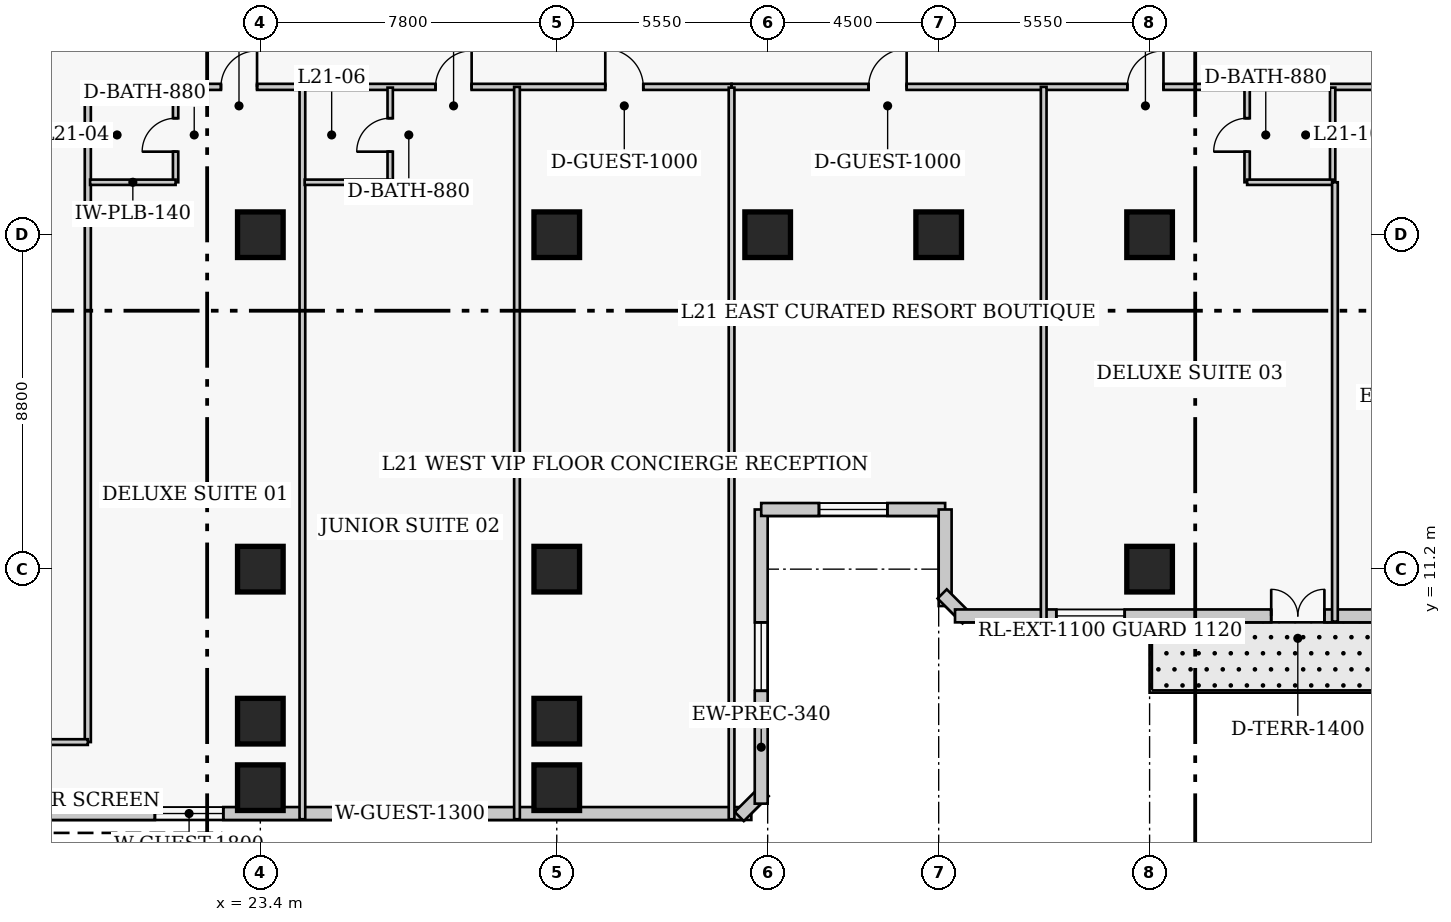
"""IFC4 building model, lengths in metres.
Left out: names, types, materials, properties, quantities, classifications, styles, units other than length and angle.
Written with IfcOpenShell. Run it as: python <this file> out.ifc"""

import sys

from ifc_helpers import new_model, si_unit, direction, frame, frame_2d, origin, origin_2d, place, context, subcontext, project, spatial, rectangle, extrude, element, fill, save


model = new_model("IFC4")
c1 = context("Model", 3, precision=1e-05, world=origin(), true_north=direction((0.0, 1.0)))
c2 = subcontext(c1, "Body", "Model", "MODEL_VIEW")
j1 = project(units=[si_unit("LENGTHUNIT", "METRE"), si_unit("PLANEANGLEUNIT", "RADIAN")], contexts=[c1])
p1 = place(None, origin())
s1 = spatial("IfcSite", under=j1, at=p1, CompositionType="ELEMENT")
p2 = place(p1, origin())
s2 = spatial("IfcBuilding", under=s1, at=p2, CompositionType="ELEMENT")
p3 = place(p2, frame((0.0, 0.0, 88.0)))
s3 = spatial("IfcBuildingStorey", under=s2, at=p3, CompositionType="ELEMENT", Elevation=88.0)
for number, where, z_axis, x_axis in (
    (1, (23.4, 11.2, 0.0), (0.0, 0.0, 1.0), (1.0, 0.0, 0.0)),
    (2, (23.4, 20.0, 0.0), (0.0, 0.0, 1.0), (1.0, 0.0, 0.0)),
    (3, (31.2, 11.2, 0.0), (0.0, 0.0, 1.0), (1.0, 0.0, 0.0)),
    (4, (31.2, 20.0, 0.0), (0.0, 0.0, 1.0), (1.0, 0.0, 0.0)),
    (5, (36.75, 20.0, 0.0), (0.0, 0.0, 1.0), (1.0, 0.0, 0.0)),
    (6, (41.25, 20.0, 0.0), (0.0, 0.0, 1.0), (1.0, 0.0, 0.0)),
    (7, (46.8, 11.2, 0.0), (0.0, 0.0, 1.0), (1.0, 0.0, 0.0)),
    (8, (46.8, 20.0, 0.0), (0.0, 0.0, 1.0), (1.0, 0.0, 0.0)),
    (9, (23.4, 7.2, 0.0), (0.0, 0.0, 1.0), (1.0, 0.0, 0.0)),
    (10, (31.2, 7.2, 0.0), (0.0, 0.0, 1.0), (1.0, 0.0, 0.0)),
    (11, (23.4, 5.45, 0.0), (0.0, 0.0, 1.0), (1.0, 0.0, 0.0)),
    (12, (31.2, 5.45, 0.0), (0.0, 0.0, 1.0), (1.0, 0.0, 0.0)),
):
    element("IfcColumn", number, at=place(p3, frame(where, z_axis=z_axis, x_axis=x_axis)), inside=s3, PredefinedType="COLUMN", context=c2, shape_type="SweptSolid", body=[
        extrude(rectangle(XDim=1.2, YDim=1.2, at=origin_2d()), origin(), (0.0, 0.0, 1.0), 3.8),
    ])
p4 = place(p3, frame((8.03, 4.77, 0.0), z_axis=(0.0, 0.0, 1.0), x_axis=(1.0, 0.0, 0.0)))
e13 = element("IfcWall", 13, at=p4, inside=s3, PredefinedType="SOLIDWALL", context=c2, shape_type="SweptSolid", body=[
    extrude(rectangle(XDim=28.29, YDim=0.34, at=frame_2d((14.145, 0.0))), origin(), (0.0, 0.0, 1.0), 3.54),
])
p5 = place(p4, frame((12.595, 0.0, 0.85)))
e14 = element("IfcOpeningElement", 14, at=p5, cuts=e13, PredefinedType="OPENING", context=c2, shape_type="SweptSolid", body=[
    extrude(rectangle(XDim=1.8, YDim=1.8, at=frame_2d((0.9, 0.9))), frame((0.0, 0.18, 0.0), z_axis=(0.0, -1.0, 0.0), x_axis=(1.0, 0.0, 0.0)), (0.0, 0.0, 1.0), 0.36),
])
p6 = place(p4, frame((18.66, 0.0, 0.85)))
e15 = element("IfcOpeningElement", 15, at=p6, cuts=e13, PredefinedType="OPENING", context=c2, shape_type="SweptSolid", body=[
    extrude(rectangle(XDim=1.3, YDim=1.7, at=frame_2d((0.65, 0.85))), frame((0.0, 0.18, 0.0), z_axis=(0.0, -1.0, 0.0), x_axis=(1.0, 0.0, 0.0)), (0.0, 0.0, 1.0), 0.36),
])
p7 = place(p3, frame((36.001, 4.692, 0.0), z_axis=(0.0, 0.0, 1.0), x_axis=(0.707238225886, 0.706975312048, 0.0)))
e16 = element("IfcWall", 16, at=p7, inside=s3, PredefinedType="SOLIDWALL", context=c2, shape_type="SweptSolid", body=[
    extrude(rectangle(XDim=0.929, YDim=0.34, at=frame_2d((0.464, 0.0))), origin(), (0.0, 0.0, 1.0), 3.54),
])
p8 = place(p3, frame((36.58, 5.03, 0.0), z_axis=(0.0, 0.0, 1.0), x_axis=(0.0, 1.0, 0.0)))
e17 = element("IfcWall", 17, at=p8, inside=s3, PredefinedType="SOLIDWALL", context=c2, shape_type="SweptSolid", body=[
    extrude(rectangle(XDim=7.74, YDim=0.34, at=frame_2d((3.87, 0.0))), origin(), (0.0, 0.0, 1.0), 3.54),
])
p9 = place(p8, frame((2.97, 0.0, 0.85)))
e18 = element("IfcOpeningElement", 18, at=p9, cuts=e17, PredefinedType="OPENING", context=c2, shape_type="SweptSolid", body=[
    extrude(rectangle(XDim=1.8, YDim=1.8, at=frame_2d((0.9, 0.9))), frame((0.0, 0.18, 0.0), z_axis=(0.0, -1.0, 0.0), x_axis=(1.0, 0.0, 0.0)), (0.0, 0.0, 1.0), 0.36),
])
p10 = place(p3, frame((36.58, 12.77, 0.0), z_axis=(0.0, 0.0, 1.0), x_axis=(1.0, 0.0, 0.0)))
e19 = element("IfcWall", 19, at=p10, inside=s3, PredefinedType="SOLIDWALL", context=c2, shape_type="SweptSolid", body=[
    extrude(rectangle(XDim=4.84, YDim=0.34, at=frame_2d((2.42, 0.0))), origin(), (0.0, 0.0, 1.0), 3.54),
])
p11 = place(p10, frame((1.52, 0.0, 0.85)))
e20 = element("IfcOpeningElement", 20, at=p11, cuts=e19, PredefinedType="OPENING", context=c2, shape_type="SweptSolid", body=[
    extrude(rectangle(XDim=1.8, YDim=1.8, at=frame_2d((0.9, 0.9))), frame((0.0, 0.18, 0.0), z_axis=(0.0, -1.0, 0.0), x_axis=(1.0, 0.0, 0.0)), (0.0, 0.0, 1.0), 0.36),
])
p12 = place(p3, frame((41.42, 12.77, 0.0), z_axis=(0.0, 0.0, 1.0), x_axis=(0.0, -1.0, 0.0)))
e21 = element("IfcWall", 21, at=p12, inside=s3, PredefinedType="SOLIDWALL", context=c2, shape_type="SweptSolid", body=[
    extrude(rectangle(XDim=2.54, YDim=0.34, at=frame_2d((1.27, 0.0))), origin(), (0.0, 0.0, 1.0), 3.54),
])
p13 = place(p3, frame((41.342, 10.549, 0.0), z_axis=(0.0, 0.0, 1.0), x_axis=(0.707106781187, -0.707106781187, 0.0)))
e22 = element("IfcWall", 22, at=p13, inside=s3, PredefinedType="SOLIDWALL", context=c2, shape_type="SweptSolid", body=[
    extrude(rectangle(XDim=0.929, YDim=0.34, at=frame_2d((0.464, 0.0))), origin(), (0.0, 0.0, 1.0), 3.54),
])
p14 = place(p3, frame((41.68, 9.97, 0.0), z_axis=(0.0, 0.0, 1.0), x_axis=(1.0, 0.0, 0.0)))
e23 = element("IfcWall", 23, at=p14, inside=s3, PredefinedType="SOLIDWALL", context=c2, shape_type="SweptSolid", body=[
    extrude(rectangle(XDim=28.29, YDim=0.34, at=frame_2d((14.145, 0.0))), origin(), (0.0, 0.0, 1.0), 3.54),
])
p15 = place(p14, frame((8.32, 0.0, 0.0)))
e24 = element("IfcOpeningElement", 24, at=p15, cuts=e23, PredefinedType="OPENING", context=c2, shape_type="SweptSolid", body=[
    extrude(rectangle(XDim=1.4, YDim=2.15, at=frame_2d((0.7, 1.075))), frame((0.0, 0.18, 0.0), z_axis=(0.0, -1.0, 0.0), x_axis=(1.0, 0.0, 0.0)), (0.0, 0.0, 1.0), 0.36),
])
p16 = place(p14, frame((2.665, 0.0, 0.85)))
e25 = element("IfcOpeningElement", 25, at=p16, cuts=e23, PredefinedType="OPENING", context=c2, shape_type="SweptSolid", body=[
    extrude(rectangle(XDim=1.8, YDim=1.8, at=frame_2d((0.9, 0.9))), frame((0.0, 0.18, 0.0), z_axis=(0.0, -1.0, 0.0), x_axis=(1.0, 0.0, 0.0)), (0.0, 0.0, 1.0), 0.36),
])
p17 = place(p14, frame((13.895, 0.0, 0.85)))
e26 = element("IfcOpeningElement", 26, at=p17, cuts=e23, PredefinedType="OPENING", context=c2, shape_type="SweptSolid", body=[
    extrude(rectangle(XDim=1.8, YDim=1.8, at=frame_2d((0.9, 0.9))), frame((0.0, 0.18, 0.0), z_axis=(0.0, -1.0, 0.0), x_axis=(1.0, 0.0, 0.0)), (0.0, 0.0, 1.0), 0.36),
])
p18 = place(p3, frame((18.8, 23.89, 0.0), z_axis=(0.0, 0.0, 1.0), x_axis=(1.0, 0.0, 0.0)))
e27 = element("IfcWall", 27, at=p18, inside=s3, PredefinedType="PARTITIONING", context=c2, shape_type="SweptSolid", body=[
    extrude(rectangle(XDim=17.0, YDim=0.16, at=frame_2d((8.5, 0.0))), origin(), (0.0, 0.0, 1.0), 3.54),
])
p19 = place(p18, frame((3.563, 0.0, 0.0)))
e28 = element("IfcOpeningElement", 28, at=p19, cuts=e27, PredefinedType="OPENING", context=c2, shape_type="SweptSolid", body=[
    extrude(rectangle(XDim=0.95, YDim=2.1, at=frame_2d((0.475, 1.05))), frame((0.0, 0.09, 0.0), z_axis=(0.0, -1.0, 0.0), x_axis=(1.0, 0.0, 0.0)), (0.0, 0.0, 1.0), 0.18),
])
p20 = place(p18, frame((9.21, 0.0, 0.0)))
e29 = element("IfcOpeningElement", 29, at=p20, cuts=e27, PredefinedType="OPENING", context=c2, shape_type="SweptSolid", body=[
    extrude(rectangle(XDim=0.95, YDim=2.1, at=frame_2d((0.475, 1.05))), frame((0.0, 0.09, 0.0), z_axis=(0.0, -1.0, 0.0), x_axis=(1.0, 0.0, 0.0)), (0.0, 0.0, 1.0), 0.18),
])
p21 = place(p18, frame((13.677, 0.0, 0.0)))
e30 = element("IfcOpeningElement", 30, at=p21, cuts=e27, PredefinedType="OPENING", context=c2, shape_type="SweptSolid", body=[
    extrude(rectangle(XDim=1.0, YDim=2.15, at=frame_2d((0.5, 1.075))), frame((0.0, 0.09, 0.0), z_axis=(0.0, -1.0, 0.0), x_axis=(1.0, 0.0, 0.0)), (0.0, 0.0, 1.0), 0.18),
])
p22 = place(p3, frame((35.8, 23.89, 0.0), z_axis=(0.0, 0.0, 1.0), x_axis=(1.0, 0.0, 0.0)))
e31 = element("IfcWall", 31, at=p22, inside=s3, PredefinedType="PARTITIONING", context=c2, shape_type="SweptSolid", body=[
    extrude(rectangle(XDim=23.05, YDim=0.16, at=frame_2d((11.525, 0.0))), origin(), (0.0, 0.0, 1.0), 3.54),
])
p23 = place(p22, frame((3.607, 0.0, 0.0)))
e32 = element("IfcOpeningElement", 32, at=p23, cuts=e31, PredefinedType="OPENING", context=c2, shape_type="SweptSolid", body=[
    extrude(rectangle(XDim=1.0, YDim=2.15, at=frame_2d((0.5, 1.075))), frame((0.0, 0.09, 0.0), z_axis=(0.0, -1.0, 0.0), x_axis=(1.0, 0.0, 0.0)), (0.0, 0.0, 1.0), 0.18),
])
p24 = place(p22, frame((10.415, 0.0, 0.0)))
e33 = element("IfcOpeningElement", 33, at=p24, cuts=e31, PredefinedType="OPENING", context=c2, shape_type="SweptSolid", body=[
    extrude(rectangle(XDim=0.95, YDim=2.1, at=frame_2d((0.475, 1.05))), frame((0.0, 0.09, 0.0), z_axis=(0.0, -1.0, 0.0), x_axis=(1.0, 0.0, 0.0)), (0.0, 0.0, 1.0), 0.18),
])
p25 = place(p22, frame((17.803, 0.0, 0.0)))
e34 = element("IfcOpeningElement", 34, at=p25, cuts=e31, PredefinedType="OPENING", context=c2, shape_type="SweptSolid", body=[
    extrude(rectangle(XDim=0.95, YDim=2.1, at=frame_2d((0.475, 1.05))), frame((0.0, 0.09, 0.0), z_axis=(0.0, -1.0, 0.0), x_axis=(1.0, 0.0, 0.0)), (0.0, 0.0, 1.0), 0.18),
])
p26 = place(p3, frame((18.86, 6.65, 0.0), z_axis=(0.0, 0.0, 1.0), x_axis=(0.0, 1.0, 0.0)))
e35 = element("IfcWall", 35, at=p26, inside=s3, PredefinedType="PARTITIONING", context=c2, shape_type="SweptSolid", body=[
    extrude(rectangle(XDim=17.24, YDim=0.16, at=frame_2d((8.62, 0.0))), origin(), (0.0, 0.0, 1.0), 3.54),
])
p27 = place(p3, frame((16.64, 6.65, 0.0), z_axis=(0.0, 0.0, 1.0), x_axis=(1.0, 0.0, 0.0)))
e36 = element("IfcWall", 36, at=p27, inside=s3, PredefinedType="PARTITIONING", context=c2, shape_type="SweptSolid", body=[
    extrude(rectangle(XDim=2.22, YDim=0.15, at=frame_2d((1.11, 0.0))), origin(), (0.0, 0.0, 1.0), 3.54),
])
p28 = place(p3, frame((21.17, 21.38, 0.0), z_axis=(0.0, 0.0, 1.0), x_axis=(0.0, 1.0, 0.0)))
e37 = element("IfcWall", 37, at=p28, inside=s3, PredefinedType="PLUMBINGWALL", context=c2, shape_type="SweptSolid", body=[
    extrude(rectangle(XDim=2.49, YDim=0.14, at=frame_2d((1.245, 0.0))), origin(), (0.0, 0.0, 1.0), 3.54),
])
p29 = place(p28, frame((0.805, 0.0, 0.0)))
e38 = element("IfcOpeningElement", 38, at=p29, cuts=e37, PredefinedType="OPENING", context=c2, shape_type="SweptSolid", body=[
    extrude(rectangle(XDim=0.88, YDim=2.05, at=frame_2d((0.44, 1.025))), frame((0.0, 0.08, 0.0), z_axis=(0.0, -1.0, 0.0), x_axis=(1.0, 0.0, 0.0)), (0.0, 0.0, 1.0), 0.16),
])
p30 = place(p3, frame((18.92, 21.38, 0.0), z_axis=(0.0, 0.0, 1.0), x_axis=(1.0, 0.0, 0.0)))
e39 = element("IfcWall", 39, at=p30, inside=s3, PredefinedType="PLUMBINGWALL", context=c2, shape_type="SweptSolid", body=[
    extrude(rectangle(XDim=2.25, YDim=0.14, at=frame_2d((1.125, 0.0))), origin(), (0.0, 0.0, 1.0), 3.54),
])
p31 = place(p3, frame((24.507, 4.62, 0.0), z_axis=(0.0, 0.0, 1.0), x_axis=(0.0, 1.0, 0.0)))
e40 = element("IfcWall", 40, at=p31, inside=s3, PredefinedType="PARTITIONING", context=c2, shape_type="SweptSolid", body=[
    extrude(rectangle(XDim=19.27, YDim=0.15, at=frame_2d((9.635, 0.0))), origin(), (0.0, 0.0, 1.0), 3.54),
])
p32 = place(p3, frame((26.817, 21.38, 0.0), z_axis=(0.0, 0.0, 1.0), x_axis=(0.0, 1.0, 0.0)))
e41 = element("IfcWall", 41, at=p32, inside=s3, PredefinedType="PLUMBINGWALL", context=c2, shape_type="SweptSolid", body=[
    extrude(rectangle(XDim=2.49, YDim=0.14, at=frame_2d((1.245, 0.0))), origin(), (0.0, 0.0, 1.0), 3.54),
])
p33 = place(p32, frame((0.805, 0.0, 0.0)))
e42 = element("IfcOpeningElement", 42, at=p33, cuts=e41, PredefinedType="OPENING", context=c2, shape_type="SweptSolid", body=[
    extrude(rectangle(XDim=0.88, YDim=2.05, at=frame_2d((0.44, 1.025))), frame((0.0, 0.08, 0.0), z_axis=(0.0, -1.0, 0.0), x_axis=(1.0, 0.0, 0.0)), (0.0, 0.0, 1.0), 0.16),
])
p34 = place(p3, frame((24.567, 21.38, 0.0), z_axis=(0.0, 0.0, 1.0), x_axis=(1.0, 0.0, 0.0)))
e43 = element("IfcWall", 43, at=p34, inside=s3, PredefinedType="PLUMBINGWALL", context=c2, shape_type="SweptSolid", body=[
    extrude(rectangle(XDim=2.25, YDim=0.14, at=frame_2d((1.125, 0.0))), origin(), (0.0, 0.0, 1.0), 3.54),
])
p35 = place(p3, frame((30.153, 4.62, 0.0), z_axis=(0.0, 0.0, 1.0), x_axis=(0.0, 1.0, 0.0)))
e44 = element("IfcWall", 44, at=p35, inside=s3, PredefinedType="PARTITIONING", context=c2, shape_type="SweptSolid", body=[
    extrude(rectangle(XDim=19.27, YDim=0.15, at=frame_2d((9.635, 0.0))), origin(), (0.0, 0.0, 1.0), 3.54),
])
p36 = place(p3, frame((35.8, 4.62, 0.0), z_axis=(0.0, 0.0, 1.0), x_axis=(0.0, 1.0, 0.0)))
e45 = element("IfcWall", 45, at=p36, inside=s3, PredefinedType="PARTITIONING", context=c2, shape_type="SweptSolid", body=[
    extrude(rectangle(XDim=19.25, YDim=0.15, at=frame_2d((9.625, 0.0))), origin(), (0.0, 0.0, 1.0), 3.54),
])
p37 = place(p3, frame((44.013, 9.82, 0.0), z_axis=(0.0, 0.0, 1.0), x_axis=(0.0, 1.0, 0.0)))
e46 = element("IfcWall", 46, at=p37, inside=s3, PredefinedType="PARTITIONING", context=c2, shape_type="SweptSolid", body=[
    extrude(rectangle(XDim=14.07, YDim=0.15, at=frame_2d((7.035, 0.0))), origin(), (0.0, 0.0, 1.0), 3.54),
])
p38 = place(p3, frame((49.367, 21.38, 0.0), z_axis=(0.0, 0.0, 1.0), x_axis=(0.0, 1.0, 0.0)))
e47 = element("IfcWall", 47, at=p38, inside=s3, PredefinedType="PLUMBINGWALL", context=c2, shape_type="SweptSolid", body=[
    extrude(rectangle(XDim=2.49, YDim=0.14, at=frame_2d((1.245, 0.0))), origin(), (0.0, 0.0, 1.0), 3.54),
])
p39 = place(p38, frame((0.805, 0.0, 0.0)))
e48 = element("IfcOpeningElement", 48, at=p39, cuts=e47, PredefinedType="OPENING", context=c2, shape_type="SweptSolid", body=[
    extrude(rectangle(XDim=0.88, YDim=2.05, at=frame_2d((0.44, 1.025))), frame((0.0, 0.08, 0.0), z_axis=(0.0, -1.0, 0.0), x_axis=(1.0, 0.0, 0.0)), (0.0, 0.0, 1.0), 0.16),
])
p40 = place(p3, frame((51.617, 21.38, 0.0), z_axis=(0.0, 0.0, 1.0), x_axis=(0.0, 1.0, 0.0)))
e49 = element("IfcWall", 49, at=p40, inside=s3, PredefinedType="PLUMBINGWALL", context=c2, shape_type="SweptSolid", body=[
    extrude(rectangle(XDim=2.49, YDim=0.14, at=frame_2d((1.245, 0.0))), origin(), (0.0, 0.0, 1.0), 3.54),
])
p41 = place(p3, frame((49.367, 21.38, 0.0), z_axis=(0.0, 0.0, 1.0), x_axis=(1.0, 0.0, 0.0)))
e50 = element("IfcWall", 50, at=p41, inside=s3, PredefinedType="PLUMBINGWALL", context=c2, shape_type="SweptSolid", body=[
    extrude(rectangle(XDim=2.25, YDim=0.14, at=frame_2d((1.125, 0.0))), origin(), (0.0, 0.0, 1.0), 3.54),
])
p42 = place(p3, frame((51.677, 9.82, 0.0), z_axis=(0.0, 0.0, 1.0), x_axis=(0.0, 1.0, 0.0)))
e51 = element("IfcWall", 51, at=p42, inside=s3, PredefinedType="PARTITIONING", context=c2, shape_type="SweptSolid", body=[
    extrude(rectangle(XDim=11.56, YDim=0.15, at=frame_2d((5.78, 0.0))), origin(), (0.0, 0.0, 1.0), 3.54),
])
p43 = place(p5, origin())
e52 = element("IfcWindow", 52, at=p43, inside=s3, PartitioningType="SINGLE_PANEL", PredefinedType="WINDOW", context=c2, shape_type="SweptSolid", body=[
    extrude(rectangle(XDim=1.8, YDim=1.8, at=frame_2d((0.9, 0.9))), frame((0.0, 0.03, 0.0), z_axis=(0.0, -1.0, 0.0), x_axis=(1.0, 0.0, 0.0)), (0.0, 0.0, 1.0), 0.06),
])
fill(e14, e52)
p44 = place(p9, origin())
e53 = element("IfcWindow", 53, at=p44, inside=s3, PartitioningType="SINGLE_PANEL", PredefinedType="WINDOW", context=c2, shape_type="SweptSolid", body=[
    extrude(rectangle(XDim=1.8, YDim=1.8, at=frame_2d((0.9, 0.9))), frame((0.0, 0.03, 0.0), z_axis=(0.0, -1.0, 0.0), x_axis=(1.0, 0.0, 0.0)), (0.0, 0.0, 1.0), 0.06),
])
fill(e18, e53)
p45 = place(p11, origin())
e54 = element("IfcWindow", 54, at=p45, inside=s3, PartitioningType="SINGLE_PANEL", PredefinedType="WINDOW", context=c2, shape_type="SweptSolid", body=[
    extrude(rectangle(XDim=1.8, YDim=1.8, at=frame_2d((0.9, 0.9))), frame((0.0, 0.03, 0.0), z_axis=(0.0, -1.0, 0.0), x_axis=(1.0, 0.0, 0.0)), (0.0, 0.0, 1.0), 0.06),
])
fill(e20, e54)
p46 = place(p15, origin())
e55 = element("IfcDoor", 55, at=p46, inside=s3, OperationType="DOUBLE_DOOR_SINGLE_SWING", PredefinedType="DOOR", context=c2, shape_type="SweptSolid", body=[
    extrude(rectangle(XDim=1.4, YDim=2.15, at=frame_2d((0.7, 1.075))), frame((0.0, 0.025, 0.0), z_axis=(0.0, -1.0, 0.0), x_axis=(1.0, 0.0, 0.0)), (0.0, 0.0, 1.0), 0.05),
])
fill(e24, e55)
p47 = place(p16, origin())
e56 = element("IfcWindow", 56, at=p47, inside=s3, PartitioningType="SINGLE_PANEL", PredefinedType="WINDOW", context=c2, shape_type="SweptSolid", body=[
    extrude(rectangle(XDim=1.8, YDim=1.8, at=frame_2d((0.9, 0.9))), frame((0.0, 0.03, 0.0), z_axis=(0.0, -1.0, 0.0), x_axis=(1.0, 0.0, 0.0)), (0.0, 0.0, 1.0), 0.06),
])
fill(e25, e56)
p48 = place(p6, origin())
e57 = element("IfcWindow", 57, at=p48, inside=s3, PartitioningType="SINGLE_PANEL", PredefinedType="WINDOW", context=c2, shape_type="SweptSolid", body=[
    extrude(rectangle(XDim=1.3, YDim=1.7, at=frame_2d((0.65, 0.85))), frame((0.0, 0.03, 0.0), z_axis=(0.0, -1.0, 0.0), x_axis=(1.0, 0.0, 0.0)), (0.0, 0.0, 1.0), 0.06),
])
fill(e15, e57)
p49 = place(p29, origin())
e58 = element("IfcDoor", 58, at=p49, inside=s3, OperationType="SINGLE_SWING_LEFT", PredefinedType="DOOR", context=c2, shape_type="SweptSolid", body=[
    extrude(rectangle(XDim=0.88, YDim=2.05, at=frame_2d((0.44, 1.025))), frame((0.0, 0.025, 0.0), z_axis=(0.0, -1.0, 0.0), x_axis=(1.0, 0.0, 0.0)), (0.0, 0.0, 1.0), 0.05),
])
fill(e38, e58)
p50 = place(p19, origin())
e59 = element("IfcDoor", 59, at=p50, inside=s3, OperationType="SINGLE_SWING_RIGHT", PredefinedType="DOOR", context=c2, shape_type="SweptSolid", body=[
    extrude(rectangle(XDim=0.95, YDim=2.1, at=frame_2d((0.475, 1.05))), frame((0.0, 0.025, 0.0), z_axis=(0.0, -1.0, 0.0), x_axis=(1.0, 0.0, 0.0)), (0.0, 0.0, 1.0), 0.05),
])
fill(e28, e59)
p51 = place(p33, origin())
e60 = element("IfcDoor", 60, at=p51, inside=s3, OperationType="SINGLE_SWING_LEFT", PredefinedType="DOOR", context=c2, shape_type="SweptSolid", body=[
    extrude(rectangle(XDim=0.88, YDim=2.05, at=frame_2d((0.44, 1.025))), frame((0.0, 0.025, 0.0), z_axis=(0.0, -1.0, 0.0), x_axis=(1.0, 0.0, 0.0)), (0.0, 0.0, 1.0), 0.05),
])
fill(e42, e60)
p52 = place(p20, origin())
e61 = element("IfcDoor", 61, at=p52, inside=s3, OperationType="SINGLE_SWING_RIGHT", PredefinedType="DOOR", context=c2, shape_type="SweptSolid", body=[
    extrude(rectangle(XDim=0.95, YDim=2.1, at=frame_2d((0.475, 1.05))), frame((0.0, 0.025, 0.0), z_axis=(0.0, -1.0, 0.0), x_axis=(1.0, 0.0, 0.0)), (0.0, 0.0, 1.0), 0.05),
])
fill(e29, e61)
p53 = place(p21, origin())
e62 = element("IfcDoor", 62, at=p53, inside=s3, OperationType="SINGLE_SWING_LEFT", PredefinedType="DOOR", context=c2, shape_type="SweptSolid", body=[
    extrude(rectangle(XDim=1.0, YDim=2.15, at=frame_2d((0.5, 1.075))), frame((0.0, 0.025, 0.0), z_axis=(0.0, -1.0, 0.0), x_axis=(1.0, 0.0, 0.0)), (0.0, 0.0, 1.0), 0.05),
])
fill(e30, e62)
p54 = place(p23, origin())
e63 = element("IfcDoor", 63, at=p54, inside=s3, OperationType="SINGLE_SWING_RIGHT", PredefinedType="DOOR", context=c2, shape_type="SweptSolid", body=[
    extrude(rectangle(XDim=1.0, YDim=2.15, at=frame_2d((0.5, 1.075))), frame((0.0, 0.025, 0.0), z_axis=(0.0, -1.0, 0.0), x_axis=(1.0, 0.0, 0.0)), (0.0, 0.0, 1.0), 0.05),
])
fill(e32, e63)
p55 = place(p39, origin())
e64 = element("IfcDoor", 64, at=p55, inside=s3, OperationType="SINGLE_SWING_LEFT", PredefinedType="DOOR", context=c2, shape_type="SweptSolid", body=[
    extrude(rectangle(XDim=0.88, YDim=2.05, at=frame_2d((0.44, 1.025))), frame((0.0, 0.025, 0.0), z_axis=(0.0, -1.0, 0.0), x_axis=(1.0, 0.0, 0.0)), (0.0, 0.0, 1.0), 0.05),
])
fill(e48, e64)
p56 = place(p24, origin())
e65 = element("IfcDoor", 65, at=p56, inside=s3, OperationType="SINGLE_SWING_RIGHT", PredefinedType="DOOR", context=c2, shape_type="SweptSolid", body=[
    extrude(rectangle(XDim=0.95, YDim=2.1, at=frame_2d((0.475, 1.05))), frame((0.0, 0.025, 0.0), z_axis=(0.0, -1.0, 0.0), x_axis=(1.0, 0.0, 0.0)), (0.0, 0.0, 1.0), 0.05),
])
fill(e33, e65)
save(model, sys.argv[1])
